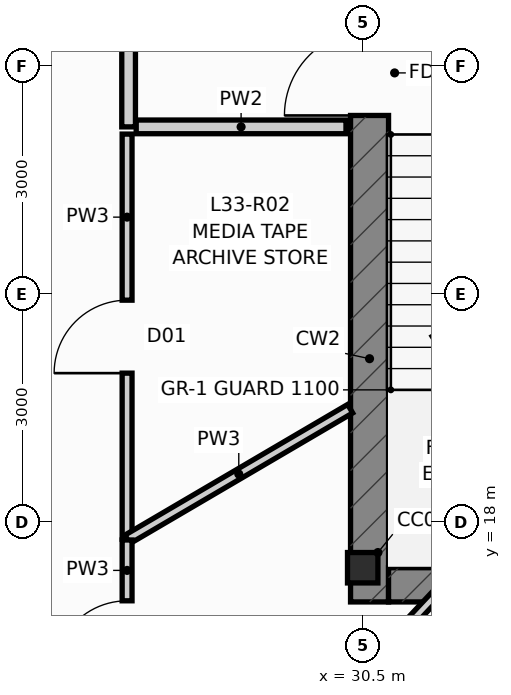
"""IFC4 building model, lengths in metres.
Left out: names, types, materials, properties, quantities, classifications, styles, units other than length and angle.
Written with IfcOpenShell. Run it as: python <this file> out.ifc"""

import sys

from ifc_helpers import new_model, si_unit, direction, frame, frame_2d, origin, origin_2d, place, context, subcontext, project, spatial, rectangle, i_section, extrude, source, transform, mapped, element, fill, save


model = new_model("IFC4")
c1 = context("Model", 3, precision=1e-05, world=origin(), true_north=direction((0.0, 1.0)))
c2 = subcontext(c1, "Body", "Model", "MODEL_VIEW")
j1 = project(units=[si_unit("LENGTHUNIT", "METRE"), si_unit("PLANEANGLEUNIT", "RADIAN")], contexts=[c1])
p1 = place(None, origin())
s1 = spatial("IfcSite", under=j1, at=p1, CompositionType="ELEMENT")
p2 = place(p1, origin())
s2 = spatial("IfcBuilding", under=s1, at=p2, CompositionType="ELEMENT")
p3 = place(p2, frame((0.0, 0.0, 127.3)))
s3 = spatial("IfcBuildingStorey", under=s2, at=p3, CompositionType="ELEMENT", Elevation=127.3)
m1 = source(origin(), c2, "Body", "SweptSolid", [
    extrude(i_section(OverallWidth=0.4, OverallDepth=0.4, WebThickness=0.02, FlangeThickness=0.032, at=origin_2d()), origin(), (0.0, 0.0, 1.0), 4.5),
])
p4 = place(p3, frame((30.5, 17.4, 0.0), z_axis=(0.0, 0.0, 1.0), x_axis=(1.0, 0.0, 0.0)))
e1 = element("IfcColumn", 1, at=p4, inside=s3, PredefinedType="COLUMN", context=c2, shape_type="MappedRepresentation", body=[
    mapped(m1, transform((0.0, 0.0, 0.0), scale=1.0)),
])
p5 = place(p3, frame((30.59, 16.95, 0.0), z_axis=(0.0, 0.0, 1.0), x_axis=(0.0, 1.0, 0.0)))
e2 = element("IfcWall", 2, at=p5, inside=s3, PredefinedType="SHEAR", context=c2, shape_type="SweptSolid", body=[
    extrude(rectangle(XDim=13.275, YDim=0.5, at=frame_2d((6.638, 0.0))), origin(), (0.0, 0.0, 1.0), 4.5),
])
p6 = place(p5, frame((6.4, 0.0, 0.0)))
e3 = element("IfcOpeningElement", 3, at=p6, cuts=e2, PredefinedType="OPENING", context=c2, shape_type="SweptSolid", body=[
    extrude(rectangle(XDim=1.12, YDim=2.15, at=frame_2d((0.56, 1.075))), frame((0.0, 0.262, 0.0), z_axis=(0.0, -1.0, 0.0), x_axis=(1.0, 0.0, 0.0)), (0.0, 0.0, 1.0), 0.524),
])
p7 = place(p5, frame((10.85, 0.0, 0.0)))
e4 = element("IfcOpeningElement", 4, at=p7, cuts=e2, PredefinedType="OPENING", context=c2, shape_type="SweptSolid", body=[
    extrude(rectangle(XDim=1.2, YDim=2.2, at=frame_2d((0.6, 1.1))), frame((0.0, 0.262, 0.0), z_axis=(0.0, -1.0, 0.0), x_axis=(1.0, 0.0, 0.0)), (0.0, 0.0, 1.0), 0.524),
])
p8 = place(p3, frame((30.84, 17.175, 0.0), z_axis=(0.0, 0.0, 1.0), x_axis=(1.0, 0.0, 0.0)))
e5 = element("IfcWall", 5, at=p8, inside=s3, PredefinedType="SHEAR", context=c2, shape_type="SweptSolid", body=[
    extrude(rectangle(XDim=2.9, YDim=0.45, at=frame_2d((1.45, 0.0))), origin(), (0.0, 0.0, 1.0), 4.5),
])
p9 = place(p3, frame((27.42, 23.2, 0.0), z_axis=(0.0, 0.0, 1.0), x_axis=(0.0, 1.0, 0.0)))
e6 = element("IfcWall", 6, at=p9, inside=s3, PredefinedType="PARTITIONING", context=c2, shape_type="SweptSolid", body=[
    extrude(rectangle(XDim=6.4, YDim=0.18, at=frame_2d((3.2, 0.0))), origin(), (0.0, 0.0, 1.0), 3.928),
])
p10 = place(p9, frame((2.65, 0.0, 0.0)))
e7 = element("IfcOpeningElement", 7, at=p10, cuts=e6, PredefinedType="OPENING", context=c2, shape_type="SweptSolid", body=[
    extrude(rectangle(XDim=1.05, YDim=2.15, at=frame_2d((0.525, 1.075))), frame((0.0, 0.102, 0.0), z_axis=(0.0, -1.0, 0.0), x_axis=(1.0, 0.0, 0.0)), (0.0, 0.0, 1.0), 0.204),
])
p11 = place(p3, frame((27.52, 23.2, 0.0), z_axis=(0.0, 0.0, 1.0), x_axis=(1.0, 0.0, 0.0)))
e8 = element("IfcWall", 8, at=p11, inside=s3, PredefinedType="PARTITIONING", context=c2, shape_type="SweptSolid", body=[
    extrude(rectangle(XDim=2.76, YDim=0.18, at=frame_2d((1.38, 0.0))), origin(), (0.0, 0.0, 1.0), 4.25),
])
p12 = place(p3, frame((20.781, 5.646, 0.0), z_axis=(0.0, 0.0, 1.0), x_axis=(0.684024279875, 0.729459241179, 0.0)))
e9 = element("IfcWall", 9, at=p12, inside=s3, PredefinedType="PARTITIONING", context=c2, shape_type="SweptSolid", body=[
    extrude(rectangle(XDim=15.626, YDim=0.13, at=frame_2d((7.813, 0.0))), origin(), (0.0, 0.0, 1.0), 3.775),
])
p13 = place(p12, frame((7.399, 0.0, 0.0)))
e10 = element("IfcOpeningElement", 10, at=p13, cuts=e9, PredefinedType="OPENING", context=c2, shape_type="SweptSolid", body=[
    extrude(rectangle(XDim=0.96, YDim=2.15, at=frame_2d((0.48, 1.075))), frame((0.0, 0.077, 0.0), z_axis=(0.0, -1.0, 0.0), x_axis=(1.0, 0.0, 0.0)), (0.0, 0.0, 1.0), 0.154),
])
p14 = place(p3, frame((28.769, 5.747, 0.0), z_axis=(0.0, 0.0, 1.0), x_axis=(0.451262780951, 0.892391115223, 0.0)))
e11 = element("IfcWall", 11, at=p14, inside=s3, PredefinedType="PARTITIONING", context=c2, shape_type="SweptSolid", body=[
    extrude(rectangle(XDim=12.647, YDim=0.13, at=frame_2d((6.324, 0.0))), origin(), (0.0, 0.0, 1.0), 4.25),
])
p15 = place(p14, frame((5.898, 0.0, 0.0)))
e12 = element("IfcOpeningElement", 12, at=p15, cuts=e11, PredefinedType="OPENING", context=c2, shape_type="SweptSolid", body=[
    extrude(rectangle(XDim=0.96, YDim=2.15, at=frame_2d((0.48, 1.075))), frame((0.0, 0.077, 0.0), z_axis=(0.0, -1.0, 0.0), x_axis=(1.0, 0.0, 0.0)), (0.0, 0.0, 1.0), 0.154),
])
p16 = place(p3, frame((27.4, 17.775, 0.0), z_axis=(0.0, 0.0, 1.0), x_axis=(0.0, 1.0, 0.0)))
e13 = element("IfcWall", 13, at=p16, inside=s3, PredefinedType="PARTITIONING", context=c2, shape_type="SweptSolid", body=[
    extrude(rectangle(XDim=5.33, YDim=0.13, at=frame_2d((2.665, 0.0))), origin(), (0.0, 0.0, 1.0), 4.25),
])
p17 = place(p16, frame((2.185, 0.0, 0.0)))
e14 = element("IfcOpeningElement", 14, at=p17, cuts=e13, PredefinedType="OPENING", context=c2, shape_type="SweptSolid", body=[
    extrude(rectangle(XDim=0.96, YDim=2.15, at=frame_2d((0.48, 1.075))), frame((0.0, 0.077, 0.0), z_axis=(0.0, -1.0, 0.0), x_axis=(1.0, 0.0, 0.0)), (0.0, 0.0, 1.0), 0.154),
])
p18 = place(p3, frame((27.404, 17.773, 0.0), z_axis=(0.0, 0.0, 1.0), x_axis=(0.86258552872, 0.505911262617, 0.0)))
e15 = element("IfcWall", 15, at=p18, inside=s3, PredefinedType="PARTITIONING", context=c2, shape_type="SweptSolid", body=[
    extrude(rectangle(XDim=3.398, YDim=0.13, at=frame_2d((1.699, 0.0))), origin(), (0.0, 0.0, 1.0), 4.25),
])
p19 = place(p3, frame((27.4, 15.205, 0.0), z_axis=(0.0, 0.0, 1.0), x_axis=(0.0, 1.0, 0.0)))
e16 = element("IfcWall", 16, at=p19, inside=s3, PredefinedType="PARTITIONING", context=c2, shape_type="SweptSolid", body=[
    extrude(rectangle(XDim=2.56, YDim=0.13, at=frame_2d((1.28, 0.0))), origin(), (0.0, 0.0, 1.0), 4.25),
])
p20 = place(p19, frame((0.8, 0.0, 0.0)))
e17 = element("IfcOpeningElement", 17, at=p20, cuts=e16, PredefinedType="OPENING", context=c2, shape_type="SweptSolid", body=[
    extrude(rectangle(XDim=0.96, YDim=2.15, at=frame_2d((0.48, 1.075))), frame((0.0, 0.077, 0.0), z_axis=(0.0, -1.0, 0.0), x_axis=(1.0, 0.0, 0.0)), (0.0, 0.0, 1.0), 0.154),
])
p21 = place(p6, origin())
e18 = element("IfcDoor", 18, at=p21, inside=s3, OperationType="SINGLE_SWING_LEFT", PredefinedType="DOOR", context=c2, shape_type="SweptSolid", body=[
    extrude(rectangle(XDim=1.12, YDim=2.15, at=frame_2d((0.56, 1.075))), frame((0.0, 0.025, 0.0), z_axis=(0.0, -1.0, 0.0), x_axis=(1.0, 0.0, 0.0)), (0.0, 0.0, 1.0), 0.05),
])
fill(e3, e18)
p22 = place(p17, origin())
e19 = element("IfcDoor", 19, at=p22, inside=s3, OperationType="SINGLE_SWING_LEFT", PredefinedType="DOOR", context=c2, shape_type="SweptSolid", body=[
    extrude(rectangle(XDim=0.96, YDim=2.15, at=frame_2d((0.48, 1.075))), frame((0.0, 0.025, 0.0), z_axis=(0.0, -1.0, 0.0), x_axis=(1.0, 0.0, 0.0)), (0.0, 0.0, 1.0), 0.05),
])
fill(e14, e19)
p23 = place(p20, origin())
e20 = element("IfcDoor", 20, at=p23, inside=s3, OperationType="SINGLE_SWING_LEFT", PredefinedType="DOOR", context=c2, shape_type="SweptSolid", body=[
    extrude(rectangle(XDim=0.96, YDim=2.15, at=frame_2d((0.48, 1.075))), frame((0.0, 0.025, 0.0), z_axis=(0.0, -1.0, 0.0), x_axis=(1.0, 0.0, 0.0)), (0.0, 0.0, 1.0), 0.05),
])
fill(e17, e20)
save(model, sys.argv[1])
